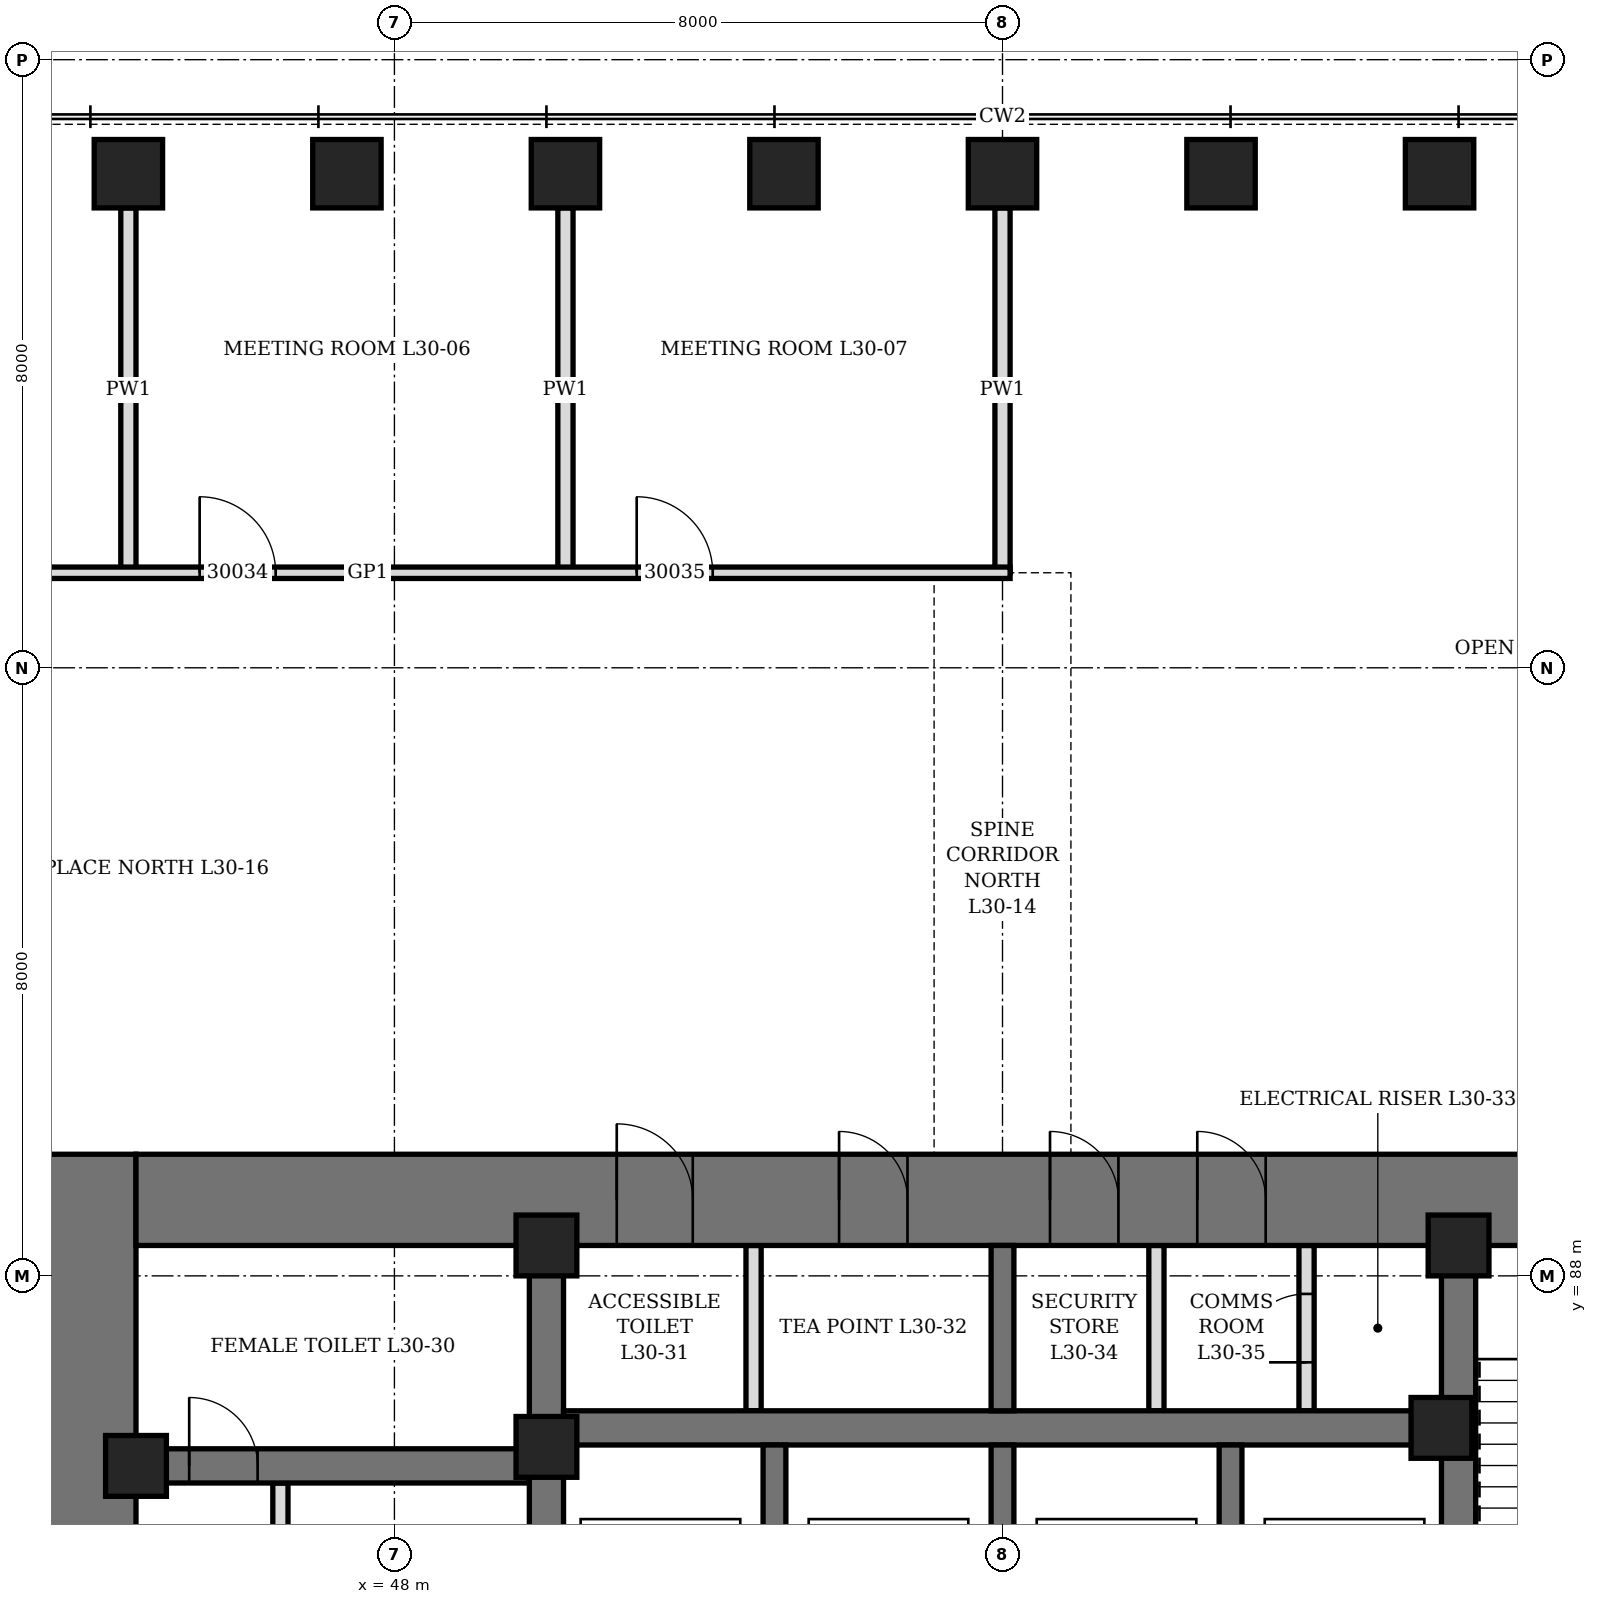
"""IFC4 building model, lengths in metres.
Left out: names, types, materials, properties, quantities, classifications, styles, units other than length and angle.
Written with IfcOpenShell. Run it as: python <this file> out.ifc"""

import sys

from ifc_helpers import new_model, si_unit, direction, frame, frame_2d, origin, origin_2d, place, context, subcontext, project, spatial, rectangle, hollow_rectangle, extrude, element, fill, save


model = new_model("IFC4")
c1 = context("Model", 3, precision=1e-05, world=origin(), true_north=direction((0.0, 1.0)))
c2 = subcontext(c1, "Body", "Model", "MODEL_VIEW")
j1 = project(units=[si_unit("LENGTHUNIT", "METRE"), si_unit("PLANEANGLEUNIT", "RADIAN")], contexts=[c1])
p1 = place(None, origin())
s1 = spatial("IfcSite", under=j1, at=p1, CompositionType="ELEMENT")
p2 = place(p1, origin())
s2 = spatial("IfcBuilding", under=s1, at=p2, CompositionType="ELEMENT")
p3 = place(p2, frame((0.0, 0.0, 137.5)))
s3 = spatial("IfcBuildingStorey", under=s2, at=p3, CompositionType="ELEMENT", Elevation=137.5)
for number, where, z_axis, x_axis in (
    (1, (61.75, 102.5, 0.0), (0.0, 0.0, 1.0), (1.0, 0.0, 0.0)),
    (2, (58.875, 102.5, 0.0), (0.0, 0.0, 1.0), (1.0, 0.0, 0.0)),
    (3, (56.0, 102.5, 0.0), (0.0, 0.0, 1.0), (1.0, 0.0, 0.0)),
    (4, (53.125, 102.5, 0.0), (0.0, 0.0, 1.0), (1.0, 0.0, 0.0)),
    (5, (50.25, 102.5, 0.0), (0.0, 0.0, 1.0), (1.0, 0.0, 0.0)),
    (6, (47.375, 102.5, 0.0), (0.0, 0.0, 1.0), (1.0, 0.0, 0.0)),
    (7, (44.5, 102.5, 0.0), (0.0, 0.0, 1.0), (1.0, 0.0, 0.0)),
):
    element("IfcColumn", number, at=place(p3, frame(where, z_axis=z_axis, x_axis=x_axis)), inside=s3, PredefinedType="COLUMN", context=c2, shape_type="SweptSolid", body=[
        extrude(hollow_rectangle(XDim=0.9, YDim=0.9, WallThickness=0.15, at=origin_2d()), origin(), (0.0, 0.0, 1.0), 4.2),
    ])
p4 = place(p3, frame((44.0, 70.4, 0.0), z_axis=(0.0, 0.0, 1.0), x_axis=(0.0, 1.0, 0.0)))
e8 = element("IfcWall", 8, at=p4, inside=s3, PredefinedType="SHEAR", context=c2, shape_type="SweptSolid", body=[
    extrude(rectangle(XDim=19.2, YDim=1.2, at=frame_2d((9.6, 0.0))), origin(), (0.0, 0.0, 1.0), 4.2),
])
p5 = place(p4, frame((8.6, 0.0, 0.0)))
e9 = element("IfcOpeningElement", 9, at=p5, cuts=e8, PredefinedType="OPENING", context=c2, shape_type="SweptSolid", body=[
    extrude(rectangle(XDim=2.0, YDim=2.4, at=frame_2d((1.0, 1.2))), frame((0.0, 0.61, 0.0), z_axis=(0.0, -1.0, 0.0), x_axis=(1.0, 0.0, 0.0)), (0.0, 0.0, 1.0), 1.22),
])
p6 = place(p3, frame((44.6, 89.0, 0.0), z_axis=(0.0, 0.0, 1.0), x_axis=(1.0, 0.0, 0.0)))
e10 = element("IfcWall", 10, at=p6, inside=s3, PredefinedType="SHEAR", context=c2, shape_type="SweptSolid", body=[
    extrude(rectangle(XDim=22.8, YDim=1.2, at=frame_2d((11.4, 0.0))), origin(), (0.0, 0.0, 1.0), 4.2),
])
p7 = place(p6, frame((6.325, 0.0, 0.0)))
e11 = element("IfcOpeningElement", 11, at=p7, cuts=e10, PredefinedType="OPENING", context=c2, shape_type="SweptSolid", body=[
    extrude(rectangle(XDim=1.0, YDim=2.1, at=frame_2d((0.5, 1.05))), frame((0.0, 0.61, 0.0), z_axis=(0.0, -1.0, 0.0), x_axis=(1.0, 0.0, 0.0)), (0.0, 0.0, 1.0), 1.22),
])
p8 = place(p6, frame((9.25, 0.0, 0.0)))
e12 = element("IfcOpeningElement", 12, at=p8, cuts=e10, PredefinedType="OPENING", context=c2, shape_type="SweptSolid", body=[
    extrude(rectangle(XDim=0.9, YDim=2.1, at=frame_2d((0.45, 1.05))), frame((0.0, 0.61, 0.0), z_axis=(0.0, -1.0, 0.0), x_axis=(1.0, 0.0, 0.0)), (0.0, 0.0, 1.0), 1.22),
])
p9 = place(p6, frame((12.025, 0.0, 0.0)))
e13 = element("IfcOpeningElement", 13, at=p9, cuts=e10, PredefinedType="OPENING", context=c2, shape_type="SweptSolid", body=[
    extrude(rectangle(XDim=0.9, YDim=2.1, at=frame_2d((0.45, 1.05))), frame((0.0, 0.61, 0.0), z_axis=(0.0, -1.0, 0.0), x_axis=(1.0, 0.0, 0.0)), (0.0, 0.0, 1.0), 1.22),
])
p10 = place(p6, frame((13.962, 0.0, 0.0)))
e14 = element("IfcOpeningElement", 14, at=p10, cuts=e10, PredefinedType="OPENING", context=c2, shape_type="SweptSolid", body=[
    extrude(rectangle(XDim=0.9, YDim=2.1, at=frame_2d((0.45, 1.05))), frame((0.0, 0.61, 0.0), z_axis=(0.0, -1.0, 0.0), x_axis=(1.0, 0.0, 0.0)), (0.0, 0.0, 1.0), 1.22),
])
p11 = place(p3, frame((50.0, 71.6, 0.0), z_axis=(0.0, 0.0, 1.0), x_axis=(0.0, 1.0, 0.0)))
e15 = element("IfcWall", 15, at=p11, inside=s3, PredefinedType="SHEAR", context=c2, shape_type="SweptSolid", body=[
    extrude(rectangle(XDim=16.8, YDim=0.45, at=frame_2d((8.4, 0.0))), origin(), (0.0, 0.0, 1.0), 4.2),
])
p12 = place(p11, frame((7.5, 0.0, 0.0)))
e16 = element("IfcOpeningElement", 16, at=p12, cuts=e15, PredefinedType="OPENING", context=c2, shape_type="SweptSolid", body=[
    extrude(rectangle(XDim=1.8, YDim=2.4, at=frame_2d((0.9, 1.2))), frame((0.0, 0.235, 0.0), z_axis=(0.0, -1.0, 0.0), x_axis=(1.0, 0.0, 0.0)), (0.0, 0.0, 1.0), 0.47),
])
p13 = place(p3, frame((62.0, 71.6, 0.0), z_axis=(0.0, 0.0, 1.0), x_axis=(0.0, 1.0, 0.0)))
e17 = element("IfcWall", 17, at=p13, inside=s3, PredefinedType="SHEAR", context=c2, shape_type="SweptSolid", body=[
    extrude(rectangle(XDim=16.8, YDim=0.45, at=frame_2d((8.4, 0.0))), origin(), (0.0, 0.0, 1.0), 4.2),
])
p14 = place(p13, frame((7.5, 0.0, 0.0)))
e18 = element("IfcOpeningElement", 18, at=p14, cuts=e17, PredefinedType="OPENING", context=c2, shape_type="SweptSolid", body=[
    extrude(rectangle(XDim=1.8, YDim=2.4, at=frame_2d((0.9, 1.2))), frame((0.0, 0.235, 0.0), z_axis=(0.0, -1.0, 0.0), x_axis=(1.0, 0.0, 0.0)), (0.0, 0.0, 1.0), 0.47),
])
p15 = place(p3, frame((44.6, 85.5, 0.0), z_axis=(0.0, 0.0, 1.0), x_axis=(1.0, 0.0, 0.0)))
e19 = element("IfcWall", 19, at=p15, inside=s3, PredefinedType="SHEAR", context=c2, shape_type="SweptSolid", body=[
    extrude(rectangle(XDim=5.175, YDim=0.45, at=frame_2d((2.587, 0.0))), origin(), (0.0, 0.0, 1.0), 4.2),
])
p16 = place(p15, frame((0.7, 0.0, 0.0)))
e20 = element("IfcOpeningElement", 20, at=p16, cuts=e19, PredefinedType="OPENING", context=c2, shape_type="SweptSolid", body=[
    extrude(rectangle(XDim=0.9, YDim=2.1, at=frame_2d((0.45, 1.05))), frame((0.0, 0.235, 0.0), z_axis=(0.0, -1.0, 0.0), x_axis=(1.0, 0.0, 0.0)), (0.0, 0.0, 1.0), 0.47),
])
p17 = place(p3, frame((50.225, 86.0, 0.0), z_axis=(0.0, 0.0, 1.0), x_axis=(1.0, 0.0, 0.0)))
e21 = element("IfcWall", 21, at=p17, inside=s3, PredefinedType="SHEAR", context=c2, shape_type="SweptSolid", body=[
    extrude(rectangle(XDim=11.55, YDim=0.45, at=frame_2d((5.775, 0.0))), origin(), (0.0, 0.0, 1.0), 4.2),
])
for number, where, z_axis, x_axis in (
    (22, (53.0, 82.225, 0.0), (0.0, 0.0, 1.0), (0.0, 1.0, 0.0)),
    (23, (56.0, 82.225, 0.0), (0.0, 0.0, 1.0), (0.0, 1.0, 0.0)),
    (24, (59.0, 82.225, 0.0), (0.0, 0.0, 1.0), (0.0, 1.0, 0.0)),
):
    element("IfcWall", number, at=place(p3, frame(where, z_axis=z_axis, x_axis=x_axis)), inside=s3, PredefinedType="SHEAR", context=c2, shape_type="SweptSolid", body=[
        extrude(rectangle(XDim=3.55, YDim=0.3, at=frame_2d((1.775, 0.0))), origin(), (0.0, 0.0, 1.0), 4.2),
    ])
p18 = place(p3, frame((56.0, 86.225, 0.0), z_axis=(0.0, 0.0, 1.0), x_axis=(0.0, 1.0, 0.0)))
e25 = element("IfcWall", 25, at=p18, inside=s3, PredefinedType="SHEAR", context=c2, shape_type="SweptSolid", body=[
    extrude(rectangle(XDim=2.175, YDim=0.3, at=frame_2d((1.087, 0.0))), origin(), (0.0, 0.0, 1.0), 4.2),
])
for number, where, z_axis, x_axis in (
    (26, (44.6, 85.5, 0.0), (0.0, 0.0, 1.0), (1.0, 0.0, 0.0)),
    (27, (50.0, 85.75, 0.0), (0.0, 0.0, 1.0), (1.0, 0.0, 0.0)),
    (28, (50.0, 88.4, 0.0), (0.0, 0.0, 1.0), (1.0, 0.0, 0.0)),
    (29, (61.775, 86.0, 0.0), (0.0, 0.0, 1.0), (1.0, 0.0, 0.0)),
    (30, (62.0, 88.4, 0.0), (0.0, 0.0, 1.0), (1.0, 0.0, 0.0)),
):
    element("IfcColumn", number, at=place(p3, frame(where, z_axis=z_axis, x_axis=x_axis)), inside=s3, PredefinedType="COLUMN", context=c2, shape_type="SweptSolid", body=[
        extrude(hollow_rectangle(XDim=0.8, YDim=0.8, WallThickness=0.1, at=origin_2d()), origin(), (0.0, 0.0, 1.0), 4.2),
    ])
p19 = place(p3, frame((46.5, 82.225, 0.0), z_axis=(0.0, 0.0, 1.0), x_axis=(0.0, 1.0, 0.0)))
e31 = element("IfcWall", 31, at=p19, inside=s3, PredefinedType="PARTITIONING", context=c2, shape_type="SweptSolid", body=[
    extrude(rectangle(XDim=3.05, YDim=0.2, at=frame_2d((1.525, 0.0))), origin(), (0.0, 0.0, 1.0), 4.04),
])
p20 = place(p19, frame((1.075, 0.0, 0.0)))
e32 = element("IfcOpeningElement", 32, at=p20, cuts=e31, PredefinedType="OPENING", context=c2, shape_type="SweptSolid", body=[
    extrude(rectangle(XDim=0.9, YDim=2.1, at=frame_2d((0.45, 1.05))), frame((0.0, 0.11, 0.0), z_axis=(0.0, -1.0, 0.0), x_axis=(1.0, 0.0, 0.0)), (0.0, 0.0, 1.0), 0.22),
])
p21 = place(p3, frame((52.725, 86.225, 0.0), z_axis=(0.0, 0.0, 1.0), x_axis=(0.0, 1.0, 0.0)))
e33 = element("IfcWall", 33, at=p21, inside=s3, PredefinedType="PARTITIONING", context=c2, shape_type="SweptSolid", body=[
    extrude(rectangle(XDim=2.175, YDim=0.2, at=frame_2d((1.087, 0.0))), origin(), (0.0, 0.0, 1.0), 4.04),
])
p22 = place(p3, frame((60.0, 86.225, 0.0), z_axis=(0.0, 0.0, 1.0), x_axis=(0.0, 1.0, 0.0)))
e34 = element("IfcWall", 34, at=p22, inside=s3, PredefinedType="PARTITIONING", context=c2, shape_type="SweptSolid", body=[
    extrude(rectangle(XDim=2.175, YDim=0.2, at=frame_2d((1.087, 0.0))), origin(), (0.0, 0.0, 1.0), 4.04),
])
p23 = place(p22, frame((0.637, 0.0, 0.0)))
e35 = element("IfcOpeningElement", 35, at=p23, cuts=e34, PredefinedType="OPENING", context=c2, shape_type="SweptSolid", body=[
    extrude(rectangle(XDim=0.9, YDim=2.1, at=frame_2d((0.45, 1.05))), frame((0.0, 0.11, 0.0), z_axis=(0.0, -1.0, 0.0), x_axis=(1.0, 0.0, 0.0)), (0.0, 0.0, 1.0), 0.22),
])
p24 = place(p3, frame((58.025, 86.225, 0.0), z_axis=(0.0, 0.0, 1.0), x_axis=(0.0, 1.0, 0.0)))
e36 = element("IfcWall", 36, at=p24, inside=s3, PredefinedType="PARTITIONING", context=c2, shape_type="SweptSolid", body=[
    extrude(rectangle(XDim=2.175, YDim=0.2, at=frame_2d((1.087, 0.0))), origin(), (0.0, 0.0, 1.0), 4.04),
])
p25 = place(p3, frame((44.5, 97.25, 0.0), z_axis=(0.0, 0.0, 1.0), x_axis=(0.0, 1.0, 0.0)))
e37 = element("IfcWall", 37, at=p25, inside=s3, PredefinedType="PARTITIONING", context=c2, shape_type="SweptSolid", body=[
    extrude(rectangle(XDim=4.8, YDim=0.2, at=frame_2d((2.4, 0.0))), origin(), (0.0, 0.0, 1.0), 2.74),
])
for number, where, z_axis, x_axis in (
    (38, (50.25, 97.25, 0.0), (0.0, 0.0, 1.0), (0.0, 1.0, 0.0)),
    (39, (56.0, 97.25, 0.0), (0.0, 0.0, 1.0), (0.0, 1.0, 0.0)),
):
    element("IfcWall", number, at=place(p3, frame(where, z_axis=z_axis, x_axis=x_axis)), inside=s3, PredefinedType="PARTITIONING", context=c2, shape_type="SweptSolid", body=[
        extrude(rectangle(XDim=4.8, YDim=0.2, at=frame_2d((2.4, 0.0))), origin(), (0.0, 0.0, 1.0), 3.278),
    ])
p26 = place(p3, frame((39.2, 97.25, 0.0), z_axis=(0.0, 0.0, 1.0), x_axis=(1.0, 0.0, 0.0)))
e40 = element("IfcWall", 40, at=p26, inside=s3, PredefinedType="PARTITIONING", context=c2, shape_type="SweptSolid", body=[
    extrude(rectangle(XDim=16.9, YDim=0.15, at=frame_2d((8.45, 0.0))), origin(), (0.0, 0.0, 1.0), 4.04),
])
p27 = place(p26, frame((0.488, 0.0, 0.0)))
e41 = element("IfcOpeningElement", 41, at=p27, cuts=e40, PredefinedType="OPENING", context=c2, shape_type="SweptSolid", body=[
    extrude(rectangle(XDim=1.0, YDim=2.4, at=frame_2d((0.5, 1.2))), frame((0.0, 0.085, 0.0), z_axis=(0.0, -1.0, 0.0), x_axis=(1.0, 0.0, 0.0)), (0.0, 0.0, 1.0), 0.17),
])
p28 = place(p26, frame((6.238, 0.0, 0.0)))
e42 = element("IfcOpeningElement", 42, at=p28, cuts=e40, PredefinedType="OPENING", context=c2, shape_type="SweptSolid", body=[
    extrude(rectangle(XDim=1.0, YDim=2.4, at=frame_2d((0.5, 1.2))), frame((0.0, 0.085, 0.0), z_axis=(0.0, -1.0, 0.0), x_axis=(1.0, 0.0, 0.0)), (0.0, 0.0, 1.0), 0.17),
])
p29 = place(p26, frame((11.988, 0.0, 0.0)))
e43 = element("IfcOpeningElement", 43, at=p29, cuts=e40, PredefinedType="OPENING", context=c2, shape_type="SweptSolid", body=[
    extrude(rectangle(XDim=1.0, YDim=2.4, at=frame_2d((0.5, 1.2))), frame((0.0, 0.085, 0.0), z_axis=(0.0, -1.0, 0.0), x_axis=(1.0, 0.0, 0.0)), (0.0, 0.0, 1.0), 0.17),
])
p30 = place(p16, origin())
e44 = element("IfcDoor", 44, at=p30, inside=s3, OperationType="SINGLE_SWING_RIGHT", PredefinedType="DOOR", context=c2, shape_type="SweptSolid", body=[
    extrude(rectangle(XDim=0.9, YDim=2.1, at=frame_2d((0.45, 1.05))), frame((0.0, 0.225, 0.0), z_axis=(0.0, -1.0, 0.0), x_axis=(1.0, 0.0, 0.0)), (0.0, 0.0, 1.0), 0.449),
])
fill(e20, e44)
p31 = place(p7, origin())
e45 = element("IfcDoor", 45, at=p31, inside=s3, OperationType="SINGLE_SWING_LEFT", PredefinedType="DOOR", context=c2, shape_type="SweptSolid", body=[
    extrude(rectangle(XDim=1.0, YDim=2.1, at=frame_2d((0.5, 1.05))), frame((0.0, 0.35, 0.0), z_axis=(0.0, -1.0, 0.0), x_axis=(1.0, 0.0, 0.0)), (0.0, 0.0, 1.0), 0.7),
])
fill(e11, e45)
p32 = place(p8, origin())
e46 = element("IfcDoor", 46, at=p32, inside=s3, OperationType="SINGLE_SWING_LEFT", PredefinedType="DOOR", context=c2, shape_type="SweptSolid", body=[
    extrude(rectangle(XDim=0.9, YDim=2.1, at=frame_2d((0.45, 1.05))), frame((0.0, 0.35, 0.0), z_axis=(0.0, -1.0, 0.0), x_axis=(1.0, 0.0, 0.0)), (0.0, 0.0, 1.0), 0.7),
])
fill(e12, e46)
p33 = place(p9, origin())
e47 = element("IfcDoor", 47, at=p33, inside=s3, OperationType="SINGLE_SWING_LEFT", PredefinedType="DOOR", context=c2, shape_type="SweptSolid", body=[
    extrude(rectangle(XDim=0.9, YDim=2.1, at=frame_2d((0.45, 1.05))), frame((0.0, 0.35, 0.0), z_axis=(0.0, -1.0, 0.0), x_axis=(1.0, 0.0, 0.0)), (0.0, 0.0, 1.0), 0.7),
])
fill(e13, e47)
p34 = place(p10, origin())
e48 = element("IfcDoor", 48, at=p34, inside=s3, OperationType="SINGLE_SWING_LEFT", PredefinedType="DOOR", context=c2, shape_type="SweptSolid", body=[
    extrude(rectangle(XDim=0.9, YDim=2.1, at=frame_2d((0.45, 1.05))), frame((0.0, 0.35, 0.0), z_axis=(0.0, -1.0, 0.0), x_axis=(1.0, 0.0, 0.0)), (0.0, 0.0, 1.0), 0.7),
])
fill(e14, e48)
p35 = place(p23, origin())
e49 = element("IfcDoor", 49, at=p35, inside=s3, OperationType="SINGLE_SWING_LEFT", PredefinedType="DOOR", context=c2, shape_type="SweptSolid", body=[
    extrude(rectangle(XDim=0.9, YDim=2.1, at=frame_2d((0.45, 1.05))), frame((0.0, 0.1, 0.0), z_axis=(0.0, -1.0, 0.0), x_axis=(1.0, 0.0, 0.0)), (0.0, 0.0, 1.0), 0.199),
])
fill(e35, e49)
p36 = place(p28, origin())
e50 = element("IfcDoor", 50, at=p36, inside=s3, OperationType="SINGLE_SWING_RIGHT", PredefinedType="DOOR", context=c2, shape_type="SweptSolid", body=[
    extrude(rectangle(XDim=1.0, YDim=2.4, at=frame_2d((0.5, 1.2))), frame((0.0, 0.075, 0.0), z_axis=(0.0, -1.0, 0.0), x_axis=(1.0, 0.0, 0.0)), (0.0, 0.0, 1.0), 0.149),
])
fill(e42, e50)
p37 = place(p29, origin())
e51 = element("IfcDoor", 51, at=p37, inside=s3, OperationType="SINGLE_SWING_RIGHT", PredefinedType="DOOR", context=c2, shape_type="SweptSolid", body=[
    extrude(rectangle(XDim=1.0, YDim=2.4, at=frame_2d((0.5, 1.2))), frame((0.0, 0.075, 0.0), z_axis=(0.0, -1.0, 0.0), x_axis=(1.0, 0.0, 0.0)), (0.0, 0.0, 1.0), 0.149),
])
fill(e43, e51)
save(model, sys.argv[1])
